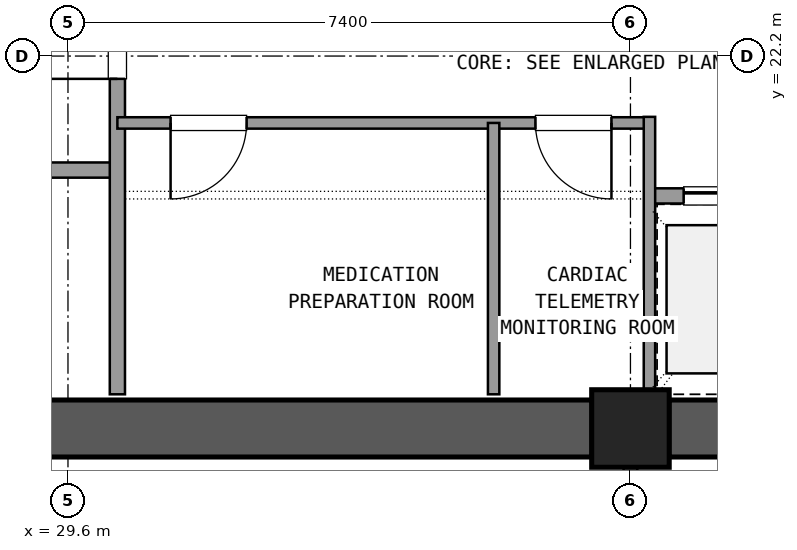
"""IFC4 building model, lengths in metres.
Left out: names, types, materials, properties, quantities, classifications, styles, units other than length and angle.
Written with IfcOpenShell. Run it as: python <this file> out.ifc"""

import sys

from ifc_helpers import new_model, si_unit, direction, frame, frame_2d, origin, origin_2d, place, context, subcontext, project, spatial, rectangle, extrude, element, fill, save


model = new_model("IFC4")
c1 = context("Model", 3, precision=1e-05, world=origin(), true_north=direction((0.0, 1.0)))
c2 = subcontext(c1, "Body", "Model", "MODEL_VIEW")
j1 = project(units=[si_unit("LENGTHUNIT", "METRE"), si_unit("PLANEANGLEUNIT", "RADIAN")], contexts=[c1])
p1 = place(None, origin())
s1 = spatial("IfcSite", under=j1, at=p1, CompositionType="ELEMENT")
p2 = place(p1, origin())
s2 = spatial("IfcBuilding", under=s1, at=p2, CompositionType="ELEMENT")
p3 = place(p2, frame((0.0, 0.0, 129.06)))
s3 = spatial("IfcBuildingStorey", under=s2, at=p3, CompositionType="ELEMENT", Elevation=129.06)
p4 = place(p3, frame((37.0, 17.3, 0.0), z_axis=(0.0, 0.0, 1.0), x_axis=(1.0, 0.0, 0.0)))
e1 = element("IfcColumn", 1, at=p4, inside=s3, PredefinedType="COLUMN", context=c2, shape_type="SweptSolid", body=[
    extrude(rectangle(XDim=1.02, YDim=1.02, at=origin_2d()), origin(), (0.0, 0.0, 1.0), 5.76),
])
for number, where, z_axis, x_axis in (
    (2, (26.305, 17.3, 0.0), (0.0, 0.0, 1.0), (1.0, 0.0, 0.0)),
    (3, (37.505, 17.3, 0.0), (0.0, 0.0, 1.0), (1.0, 0.0, 0.0)),
):
    element("IfcWall", number, at=place(p3, frame(where, z_axis=z_axis, x_axis=x_axis)), inside=s3, PredefinedType="SHEAR", context=c2, shape_type="SweptSolid", body=[
        extrude(rectangle(XDim=10.19, YDim=0.75, at=frame_2d((5.095, 0.0))), origin(), (0.0, 0.0, 1.0), 5.48),
    ])
p5 = place(p3, frame((26.25, 20.7, 0.0), z_axis=(0.0, 0.0, 1.0), x_axis=(1.0, 0.0, 0.0)))
e4 = element("IfcWall", 4, at=p5, inside=s3, PredefinedType="SOLIDWALL", context=c2, shape_type="SweptSolid", body=[
    extrude(rectangle(XDim=4.0, YDim=0.2, at=frame_2d((2.0, 0.0))), origin(), (0.0, 0.0, 1.0), 4.77),
])
p6 = place(p5, frame((0.65, 0.0, 0.0)))
e5 = element("IfcOpeningElement", 5, at=p6, cuts=e4, PredefinedType="OPENING", context=c2, shape_type="SweptSolid", body=[
    extrude(rectangle(XDim=1.2, YDim=2.15, at=frame_2d((0.6, 1.075))), frame((0.0, 0.11, 0.0), z_axis=(0.0, -1.0, 0.0), x_axis=(1.0, 0.0, 0.0)), (0.0, 0.0, 1.0), 0.22),
])
p7 = place(p3, frame((30.25, 17.75, 0.0), z_axis=(0.0, 0.0, 1.0), x_axis=(0.0, 1.0, 0.0)))
e6 = element("IfcWall", 6, at=p7, inside=s3, PredefinedType="SOLIDWALL", context=c2, shape_type="SweptSolid", body=[
    extrude(rectangle(XDim=6.9, YDim=0.2, at=frame_2d((3.45, 0.0))), origin(), (0.0, 0.0, 1.0), 4.77),
])
p8 = place(p7, frame((4.15, 0.0, 0.0)))
e7 = element("IfcOpeningElement", 7, at=p8, cuts=e6, PredefinedType="OPENING", context=c2, shape_type="SweptSolid", body=[
    extrude(rectangle(XDim=1.2, YDim=2.15, at=frame_2d((0.6, 1.075))), frame((0.0, 0.11, 0.0), z_axis=(0.0, -1.0, 0.0), x_axis=(1.0, 0.0, 0.0)), (0.0, 0.0, 1.0), 0.22),
])
p9 = place(p3, frame((30.25, 21.32, 0.0), z_axis=(0.0, 0.0, 1.0), x_axis=(1.0, 0.0, 0.0)))
e8 = element("IfcWall", 8, at=p9, inside=s3, PredefinedType="PARTITIONING", context=c2, shape_type="SweptSolid", body=[
    extrude(rectangle(XDim=7.0, YDim=0.15, at=frame_2d((3.5, 0.0))), origin(), (0.0, 0.0, 1.0), 4.77),
])
p10 = place(p9, frame((0.7, 0.0, 0.0)))
e9 = element("IfcOpeningElement", 9, at=p10, cuts=e8, PredefinedType="OPENING", context=c2, shape_type="SweptSolid", body=[
    extrude(rectangle(XDim=1.0, YDim=2.15, at=frame_2d((0.5, 1.075))), frame((0.0, 0.085, 0.0), z_axis=(0.0, -1.0, 0.0), x_axis=(1.0, 0.0, 0.0)), (0.0, 0.0, 1.0), 0.17),
])
p11 = place(p9, frame((5.5, 0.0, 0.0)))
e10 = element("IfcOpeningElement", 10, at=p11, cuts=e8, PredefinedType="OPENING", context=c2, shape_type="SweptSolid", body=[
    extrude(rectangle(XDim=1.0, YDim=2.15, at=frame_2d((0.5, 1.075))), frame((0.0, 0.085, 0.0), z_axis=(0.0, -1.0, 0.0), x_axis=(1.0, 0.0, 0.0)), (0.0, 0.0, 1.0), 0.17),
])
p12 = place(p3, frame((35.2, 17.75, 0.0), z_axis=(0.0, 0.0, 1.0), x_axis=(0.0, 1.0, 0.0)))
e11 = element("IfcWall", 11, at=p12, inside=s3, PredefinedType="PARTITIONING", context=c2, shape_type="SweptSolid", body=[
    extrude(rectangle(XDim=3.57, YDim=0.15, at=frame_2d((1.785, 0.0))), origin(), (0.0, 0.0, 1.0), 4.77),
])
p13 = place(p3, frame((37.25, 20.36, 0.0), z_axis=(0.0, 0.0, 1.0), x_axis=(1.0, 0.0, 0.0)))
e12 = element("IfcWall", 12, at=p13, inside=s3, PredefinedType="SOLIDWALL", context=c2, shape_type="SweptSolid", body=[
    extrude(rectangle(XDim=6.1, YDim=0.2, at=frame_2d((3.05, 0.0))), origin(), (0.0, 0.0, 1.0), 4.77),
])
p14 = place(p13, frame((0.45, 0.0, 0.0)))
e13 = element("IfcOpeningElement", 13, at=p14, cuts=e12, PredefinedType="OPENING", context=c2, shape_type="SweptSolid", body=[
    extrude(rectangle(XDim=1.1, YDim=2.15, at=frame_2d((0.55, 1.075))), frame((0.0, 0.11, 0.0), z_axis=(0.0, -1.0, 0.0), x_axis=(1.0, 0.0, 0.0)), (0.0, 0.0, 1.0), 0.22),
])
p15 = place(p13, frame((2.5, 0.0, 0.0)))
e14 = element("IfcOpeningElement", 14, at=p15, cuts=e12, PredefinedType="OPENING", context=c2, shape_type="SweptSolid", body=[
    extrude(rectangle(XDim=1.1, YDim=2.15, at=frame_2d((0.55, 1.075))), frame((0.0, 0.11, 0.0), z_axis=(0.0, -1.0, 0.0), x_axis=(1.0, 0.0, 0.0)), (0.0, 0.0, 1.0), 0.22),
])
p16 = place(p13, frame((4.55, 0.0, 0.0)))
e15 = element("IfcOpeningElement", 15, at=p16, cuts=e12, PredefinedType="OPENING", context=c2, shape_type="SweptSolid", body=[
    extrude(rectangle(XDim=1.1, YDim=2.15, at=frame_2d((0.55, 1.075))), frame((0.0, 0.11, 0.0), z_axis=(0.0, -1.0, 0.0), x_axis=(1.0, 0.0, 0.0)), (0.0, 0.0, 1.0), 0.22),
])
p17 = place(p3, frame((37.25, 17.75, 0.0), z_axis=(0.0, 0.0, 1.0), x_axis=(0.0, 1.0, 0.0)))
e16 = element("IfcWall", 16, at=p17, inside=s3, PredefinedType="PARTITIONING", context=c2, shape_type="SweptSolid", body=[
    extrude(rectangle(XDim=3.65, YDim=0.15, at=frame_2d((1.825, 0.0))), origin(), (0.0, 0.0, 1.0), 4.77),
])
p18 = place(p3, frame((37.0, 14.29, 0.0), z_axis=(0.0, 0.0, 1.0), x_axis=(0.0, 1.0, 0.0)))
e17 = element("IfcWall", 17, at=p18, inside=s3, PredefinedType="PARTITIONING", context=c2, shape_type="SweptSolid", body=[
    extrude(rectangle(XDim=2.56, YDim=0.18, at=frame_2d((1.28, 0.0))), origin(), (0.0, 0.0, 1.0), 4.77),
])
p19 = place(p18, frame((0.28, 0.0, 0.0)))
e18 = element("IfcOpeningElement", 18, at=p19, cuts=e17, PredefinedType="OPENING", context=c2, shape_type="SweptSolid", body=[
    extrude(rectangle(XDim=2.0, YDim=2.2, at=frame_2d((1.0, 1.1))), frame((0.0, 0.1, 0.0), z_axis=(0.0, -1.0, 0.0), x_axis=(1.0, 0.0, 0.0)), (0.0, 0.0, 1.0), 0.2),
])
p20 = place(p8, origin())
e19 = element("IfcDoor", 19, at=p20, inside=s3, OperationType="SINGLE_SWING_LEFT", PredefinedType="DOOR", context=c2, shape_type="SweptSolid", body=[
    extrude(rectangle(XDim=1.2, YDim=2.15, at=frame_2d((0.6, 1.075))), frame((0.0, 0.025, 0.0), z_axis=(0.0, -1.0, 0.0), x_axis=(1.0, 0.0, 0.0)), (0.0, 0.0, 1.0), 0.05),
])
fill(e7, e19)
p21 = place(p10, frame((1.0, 0.0, 0.0), z_axis=(0.0, 0.0, 1.0), x_axis=(-1.0, 0.0, 0.0)))
e20 = element("IfcDoor", 20, at=p21, inside=s3, OperationType="SINGLE_SWING_LEFT", PredefinedType="DOOR", context=c2, shape_type="SweptSolid", body=[
    extrude(rectangle(XDim=1.0, YDim=2.15, at=frame_2d((0.5, 1.075))), frame((0.0, 0.025, 0.0), z_axis=(0.0, -1.0, 0.0), x_axis=(1.0, 0.0, 0.0)), (0.0, 0.0, 1.0), 0.05),
])
fill(e9, e20)
p22 = place(p11, frame((1.0, 0.0, 0.0), z_axis=(0.0, 0.0, 1.0), x_axis=(-1.0, 0.0, 0.0)))
e21 = element("IfcDoor", 21, at=p22, inside=s3, OperationType="SINGLE_SWING_RIGHT", PredefinedType="DOOR", context=c2, shape_type="SweptSolid", body=[
    extrude(rectangle(XDim=1.0, YDim=2.15, at=frame_2d((0.5, 1.075))), frame((0.0, 0.025, 0.0), z_axis=(0.0, -1.0, 0.0), x_axis=(1.0, 0.0, 0.0)), (0.0, 0.0, 1.0), 0.05),
])
fill(e10, e21)
p23 = place(p14, origin())
e22 = element("IfcDoor", 22, at=p23, inside=s3, OperationType="SLIDING_TO_LEFT", PredefinedType="DOOR", context=c2, shape_type="SweptSolid", body=[
    extrude(rectangle(XDim=1.1, YDim=2.15, at=frame_2d((0.55, 1.075))), frame((0.0, 0.025, 0.0), z_axis=(0.0, -1.0, 0.0), x_axis=(1.0, 0.0, 0.0)), (0.0, 0.0, 1.0), 0.05),
])
fill(e13, e22)
save(model, sys.argv[1])
